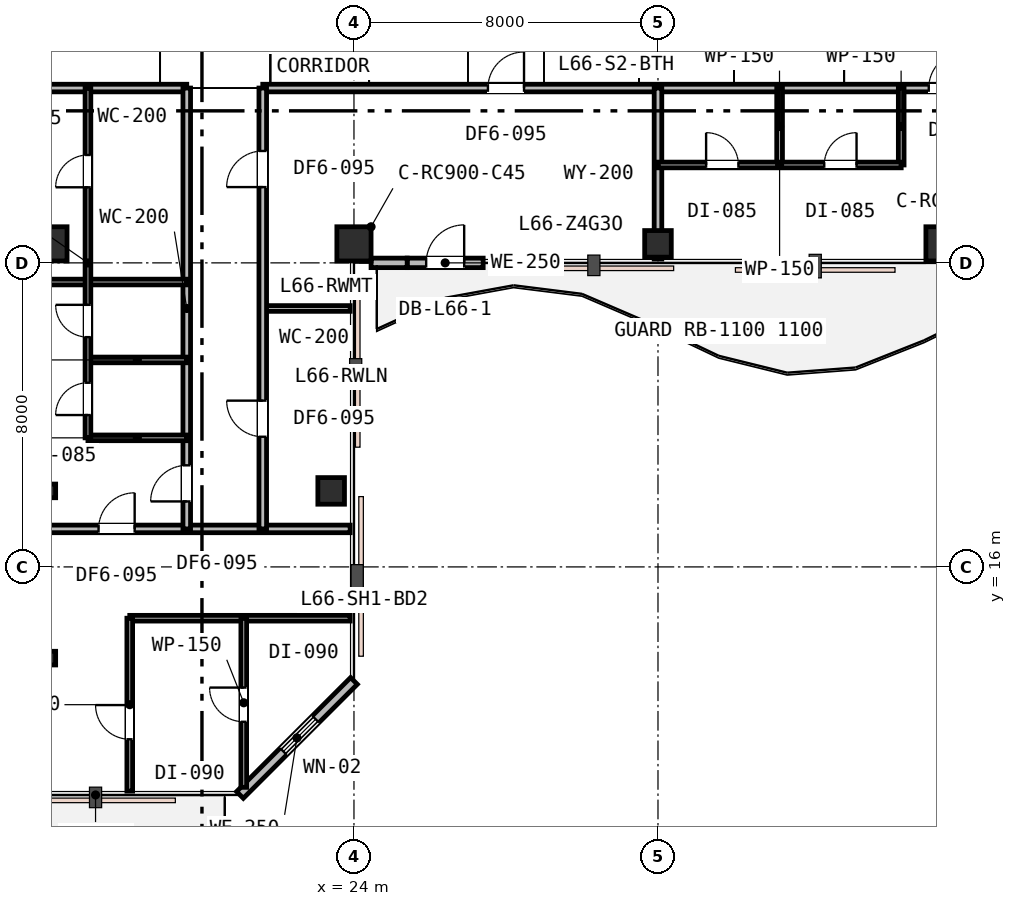
"""IFC4 building model, lengths in metres.
Left out: names, types, materials, properties, quantities, classifications, styles, units other than length and angle.
Written with IfcOpenShell. Run it as: python <this file> out.ifc"""

import sys

from ifc_helpers import new_model, si_unit, direction, frame, frame_2d, origin, origin_2d, place, context, subcontext, project, spatial, rectangle, i_section, extrude, element, fill, save


model = new_model("IFC4")
c1 = context("Model", 3, precision=1e-05, world=origin(), true_north=direction((0.0, 1.0)))
c2 = subcontext(c1, "Body", "Model", "MODEL_VIEW")
j1 = project(units=[si_unit("LENGTHUNIT", "METRE"), si_unit("PLANEANGLEUNIT", "RADIAN")], contexts=[c1])
p1 = place(None, origin())
s1 = spatial("IfcSite", under=j1, at=p1, CompositionType="ELEMENT")
p2 = place(p1, origin())
s2 = spatial("IfcBuilding", under=s1, at=p2, CompositionType="ELEMENT")
p3 = place(p2, frame((0.0, 0.0, 256.4)))
s3 = spatial("IfcBuildingStorey", under=s2, at=p3, CompositionType="ELEMENT", Elevation=256.4)
for number, where, z_axis, x_axis in (
    (1, (16.0, 24.5, 0.0), (0.0, 0.0, 1.0), (1.0, 0.0, 0.0)),
    (2, (24.0, 24.5, 0.0), (0.0, 0.0, 1.0), (1.0, 0.0, 0.0)),
):
    element("IfcColumn", number, at=place(p3, frame(where, z_axis=z_axis, x_axis=x_axis)), inside=s3, PredefinedType="COLUMN", context=c2, shape_type="SweptSolid", body=[
        extrude(rectangle(XDim=0.9, YDim=0.9, at=origin_2d()), origin(), (0.0, 0.0, 1.0), 3.8),
    ])
p4 = place(p3, frame((32.0, 24.5, 0.0), z_axis=(0.0, 0.0, 1.0), x_axis=(1.0, 0.0, 0.0)))
e3 = element("IfcColumn", 3, at=p4, inside=s3, PredefinedType="COLUMN", context=c2, shape_type="SweptSolid", body=[
    extrude(rectangle(XDim=0.7, YDim=0.7, at=origin_2d()), origin(), (0.0, 0.0, 1.0), 3.8),
])
p5 = place(p3, frame((39.5, 24.5, 0.0), z_axis=(0.0, 0.0, 1.0), x_axis=(1.0, 0.0, 0.0)))
e4 = element("IfcColumn", 4, at=p5, inside=s3, PredefinedType="COLUMN", context=c2, shape_type="SweptSolid", body=[
    extrude(rectangle(XDim=0.9, YDim=0.9, at=origin_2d()), origin(), (0.0, 0.0, 1.0), 3.8),
])
p6 = place(p3, frame((23.4, 18.0, 0.0), z_axis=(0.0, 0.0, 1.0), x_axis=(1.0, 0.0, 0.0)))
e5 = element("IfcColumn", 5, at=p6, inside=s3, PredefinedType="COLUMN", context=c2, shape_type="SweptSolid", body=[
    extrude(rectangle(XDim=0.7, YDim=0.7, at=origin_2d()), origin(), (0.0, 0.0, 1.0), 3.8),
])
for number, where, z_axis, x_axis in (
    (6, (16.0, 13.6, 0.0), (0.0, 0.0, 1.0), (1.0, 0.0, 0.0)),
    (7, (16.0, 18.0, 0.0), (0.0, 0.0, 1.0), (1.0, 0.0, 0.0)),
):
    element("IfcColumn", number, at=place(p3, frame(where, z_axis=z_axis, x_axis=x_axis)), inside=s3, PredefinedType="COLUMN", context=c2, shape_type="SweptSolid", body=[
        extrude(i_section(OverallWidth=0.3, OverallDepth=0.36, WebThickness=0.013, FlangeThickness=0.022, FilletRadius=0.027, at=origin_2d()), origin(), (0.0, 0.0, 1.0), 3.8),
    ])
p7 = place(p3, frame((21.0, 10.0, 0.0), z_axis=(0.0, 0.0, 1.0), x_axis=(0.707106781187, 0.707106781187, 0.0)))
e8 = element("IfcWall", 8, at=p7, inside=s3, PredefinedType="STANDARD", context=c2, shape_type="SweptSolid", body=[
    extrude(rectangle(XDim=4.243, YDim=0.25, at=frame_2d((2.121, 0.0))), origin(), (0.0, 0.0, 1.0), 3.53),
])
p8 = place(p7, frame((1.617, 0.0, 0.85)))
e9 = element("IfcOpeningElement", 9, at=p8, cuts=e8, PredefinedType="OPENING", context=c2, shape_type="SweptSolid", body=[
    extrude(rectangle(XDim=1.2, YDim=1.6, at=frame_2d((0.6, 0.8))), frame((0.0, 0.135, 0.0), z_axis=(0.0, -1.0, 0.0), x_axis=(1.0, 0.0, 0.0)), (0.0, 0.0, 1.0), 0.27),
])
p9 = place(p3, frame((25.4, 24.0, 0.0), z_axis=(0.0, 0.0, 1.0), x_axis=(1.0, 0.0, 0.0)))
e10 = element("IfcWall", 10, at=p9, inside=s3, PredefinedType="STANDARD", context=c2, shape_type="SweptSolid", body=[
    extrude(rectangle(XDim=2.0, YDim=0.25, at=frame_2d((1.0, 0.0))), origin(), (0.0, 0.0, 1.0), 3.27),
])
p10 = place(p9, frame((0.5, 0.0, 0.0)))
e11 = element("IfcOpeningElement", 11, at=p10, cuts=e10, PredefinedType="OPENING", context=c2, shape_type="SweptSolid", body=[
    extrude(rectangle(XDim=1.0, YDim=2.15, at=frame_2d((0.5, 1.075))), frame((0.0, 0.135, 0.0), z_axis=(0.0, -1.0, 0.0), x_axis=(1.0, 0.0, 0.0)), (0.0, 0.0, 1.0), 0.27),
])
p11 = place(p3, frame((24.45, 24.0, 0.0), z_axis=(0.0, 0.0, 1.0), x_axis=(1.0, 0.0, 0.0)))
e12 = element("IfcWall", 12, at=p11, inside=s3, PredefinedType="STANDARD", context=c2, shape_type="SweptSolid", body=[
    extrude(rectangle(XDim=0.95, YDim=0.25, at=frame_2d((0.475, 0.0))), origin(), (0.0, 0.0, 1.0), 3.27),
])
p12 = place(p3, frame((15.2, 28.6, 0.0), z_axis=(0.0, 0.0, 1.0), x_axis=(1.0, 0.0, 0.0)))
e13 = element("IfcWall", 13, at=p12, inside=s3, PredefinedType="PARTITIONING", context=c2, shape_type="SweptSolid", body=[
    extrude(rectangle(XDim=4.4, YDim=0.2, at=frame_2d((2.2, 0.0))), origin(), (0.0, 0.0, 1.0), 3.16),
])
p13 = place(p3, frame((21.6, 28.6, 0.0), z_axis=(0.0, 0.0, 1.0), x_axis=(1.0, 0.0, 0.0)))
e14 = element("IfcWall", 14, at=p13, inside=s3, PredefinedType="PARTITIONING", context=c2, shape_type="SweptSolid", body=[
    extrude(rectangle(XDim=24.3, YDim=0.2, at=frame_2d((12.15, 0.0))), origin(), (0.0, 0.0, 1.0), 3.16),
])
p14 = place(p13, frame((5.925, 0.0, 0.0)))
e15 = element("IfcOpeningElement", 15, at=p14, cuts=e14, PredefinedType="OPENING", context=c2, shape_type="SweptSolid", body=[
    extrude(rectangle(XDim=0.95, YDim=2.15, at=frame_2d((0.475, 1.075))), frame((0.0, 0.11, 0.0), z_axis=(0.0, -1.0, 0.0), x_axis=(1.0, 0.0, 0.0)), (0.0, 0.0, 1.0), 0.22),
])
p15 = place(p13, frame((17.525, 0.0, 0.0)))
e16 = element("IfcOpeningElement", 16, at=p15, cuts=e14, PredefinedType="OPENING", context=c2, shape_type="SweptSolid", body=[
    extrude(rectangle(XDim=0.95, YDim=2.15, at=frame_2d((0.475, 1.075))), frame((0.0, 0.11, 0.0), z_axis=(0.0, -1.0, 0.0), x_axis=(1.0, 0.0, 0.0)), (0.0, 0.0, 1.0), 0.22),
])
p16 = place(p3, frame((32.0, 24.1, 0.0), z_axis=(0.0, 0.0, 1.0), x_axis=(0.0, 1.0, 0.0)))
e17 = element("IfcWall", 17, at=p16, inside=s3, PredefinedType="PARTITIONING", context=c2, shape_type="SweptSolid", body=[
    extrude(rectangle(XDim=4.5, YDim=0.2, at=frame_2d((2.25, 0.0))), origin(), (0.0, 0.0, 1.0), 3.16),
])
for number, where, z_axis, x_axis in (
    (18, (38.4, 26.576, 0.0), (0.0, 0.0, 1.0), (0.0, 1.0, 0.0)),
    (19, (35.2, 26.576, 0.0), (0.0, 0.0, 1.0), (0.0, 1.0, 0.0)),
):
    element("IfcWall", number, at=place(p3, frame(where, z_axis=z_axis, x_axis=x_axis)), inside=s3, PredefinedType="PARTITIONING", context=c2, shape_type="SweptSolid", body=[
        extrude(rectangle(XDim=2.024, YDim=0.15, at=frame_2d((1.012, 0.0))), origin(), (0.0, 0.0, 1.0), 3.53),
    ])
p17 = place(p3, frame((32.0, 26.576, 0.0), z_axis=(0.0, 0.0, 1.0), x_axis=(1.0, 0.0, 0.0)))
e20 = element("IfcWall", 20, at=p17, inside=s3, PredefinedType="PARTITIONING", context=c2, shape_type="SweptSolid", body=[
    extrude(rectangle(XDim=6.4, YDim=0.15, at=frame_2d((3.2, 0.0))), origin(), (0.0, 0.0, 1.0), 3.16),
])
p18 = place(p17, frame((1.266, 0.0, 0.0)))
e21 = element("IfcOpeningElement", 21, at=p18, cuts=e20, PredefinedType="OPENING", context=c2, shape_type="SweptSolid", body=[
    extrude(rectangle(XDim=0.85, YDim=2.15, at=frame_2d((0.425, 1.075))), frame((0.0, 0.085, 0.0), z_axis=(0.0, -1.0, 0.0), x_axis=(1.0, 0.0, 0.0)), (0.0, 0.0, 1.0), 0.17),
])
p19 = place(p17, frame((4.375, 0.0, 0.0)))
e22 = element("IfcOpeningElement", 22, at=p19, cuts=e20, PredefinedType="OPENING", context=c2, shape_type="SweptSolid", body=[
    extrude(rectangle(XDim=0.85, YDim=2.15, at=frame_2d((0.425, 1.075))), frame((0.0, 0.085, 0.0), z_axis=(0.0, -1.0, 0.0), x_axis=(1.0, 0.0, 0.0)), (0.0, 0.0, 1.0), 0.17),
])
p20 = place(p3, frame((5.1, 17.0, 0.0), z_axis=(0.0, 0.0, 1.0), x_axis=(1.0, 0.0, 0.0)))
e23 = element("IfcWall", 23, at=p20, inside=s3, PredefinedType="PARTITIONING", context=c2, shape_type="SweptSolid", body=[
    extrude(rectangle(XDim=18.8, YDim=0.2, at=frame_2d((9.4, 0.0))), origin(), (0.0, 0.0, 1.0), 3.16),
])
p21 = place(p20, frame((12.179, 0.0, 0.0)))
e24 = element("IfcOpeningElement", 24, at=p21, cuts=e23, PredefinedType="OPENING", context=c2, shape_type="SweptSolid", body=[
    extrude(rectangle(XDim=0.95, YDim=2.15, at=frame_2d((0.475, 1.075))), frame((0.0, 0.11, 0.0), z_axis=(0.0, -1.0, 0.0), x_axis=(1.0, 0.0, 0.0)), (0.0, 0.0, 1.0), 0.22),
])
p22 = place(p3, frame((19.6, 17.0, 0.0), z_axis=(0.0, 0.0, 1.0), x_axis=(0.0, 1.0, 0.0)))
e25 = element("IfcWall", 25, at=p22, inside=s3, PredefinedType="PARTITIONING", context=c2, shape_type="SweptSolid", body=[
    extrude(rectangle(XDim=11.6, YDim=0.2, at=frame_2d((5.8, 0.0))), origin(), (0.0, 0.0, 1.0), 3.16),
])
p23 = place(p22, frame((0.723, 0.0, 0.0)))
e26 = element("IfcOpeningElement", 26, at=p23, cuts=e25, PredefinedType="OPENING", context=c2, shape_type="SweptSolid", body=[
    extrude(rectangle(XDim=0.95, YDim=2.15, at=frame_2d((0.475, 1.075))), frame((0.0, 0.11, 0.0), z_axis=(0.0, -1.0, 0.0), x_axis=(1.0, 0.0, 0.0)), (0.0, 0.0, 1.0), 0.22),
])
for number, where, z_axis, x_axis in (
    (27, (17.0, 19.396, 0.0), (0.0, 0.0, 1.0), (1.0, 0.0, 0.0)),
    (28, (17.0, 21.446, 0.0), (0.0, 0.0, 1.0), (1.0, 0.0, 0.0)),
):
    element("IfcWall", number, at=place(p3, frame(where, z_axis=z_axis, x_axis=x_axis)), inside=s3, PredefinedType="PARTITIONING", context=c2, shape_type="SweptSolid", body=[
        extrude(rectangle(XDim=2.6, YDim=0.15, at=frame_2d((1.3, 0.0))), origin(), (0.0, 0.0, 1.0), 3.53),
    ])
p24 = place(p3, frame((5.1, 23.496, 0.0), z_axis=(0.0, 0.0, 1.0), x_axis=(1.0, 0.0, 0.0)))
e29 = element("IfcWall", 29, at=p24, inside=s3, PredefinedType="PARTITIONING", context=c2, shape_type="SweptSolid", body=[
    extrude(rectangle(XDim=14.5, YDim=0.15, at=frame_2d((7.25, 0.0))), origin(), (0.0, 0.0, 1.0), 3.16),
])
p25 = place(p24, frame((5.5, 0.0, 0.0)))
e30 = element("IfcOpeningElement", 30, at=p25, cuts=e29, PredefinedType="OPENING", context=c2, shape_type="SweptSolid", body=[
    extrude(rectangle(XDim=0.9, YDim=2.15, at=frame_2d((0.45, 1.075))), frame((0.0, 0.085, 0.0), z_axis=(0.0, -1.0, 0.0), x_axis=(1.0, 0.0, 0.0)), (0.0, 0.0, 1.0), 0.17),
])
p26 = place(p3, frame((17.0, 19.396, 0.0), z_axis=(0.0, 0.0, 1.0), x_axis=(0.0, 1.0, 0.0)))
e31 = element("IfcWall", 31, at=p26, inside=s3, PredefinedType="PARTITIONING", context=c2, shape_type="SweptSolid", body=[
    extrude(rectangle(XDim=9.204, YDim=0.15, at=frame_2d((4.602, 0.0))), origin(), (0.0, 0.0, 1.0), 3.16),
])
p27 = place(p26, frame((0.6, 0.0, 0.0)))
e32 = element("IfcOpeningElement", 32, at=p27, cuts=e31, PredefinedType="OPENING", context=c2, shape_type="SweptSolid", body=[
    extrude(rectangle(XDim=0.85, YDim=2.15, at=frame_2d((0.425, 1.075))), frame((0.0, 0.085, 0.0), z_axis=(0.0, -1.0, 0.0), x_axis=(1.0, 0.0, 0.0)), (0.0, 0.0, 1.0), 0.17),
])
p28 = place(p26, frame((2.65, 0.0, 0.0)))
e33 = element("IfcOpeningElement", 33, at=p28, cuts=e31, PredefinedType="OPENING", context=c2, shape_type="SweptSolid", body=[
    extrude(rectangle(XDim=0.85, YDim=2.15, at=frame_2d((0.425, 1.075))), frame((0.0, 0.085, 0.0), z_axis=(0.0, -1.0, 0.0), x_axis=(1.0, 0.0, 0.0)), (0.0, 0.0, 1.0), 0.17),
])
p29 = place(p26, frame((6.593, 0.0, 0.0)))
e34 = element("IfcOpeningElement", 34, at=p29, cuts=e31, PredefinedType="OPENING", context=c2, shape_type="SweptSolid", body=[
    extrude(rectangle(XDim=0.85, YDim=2.15, at=frame_2d((0.425, 1.075))), frame((0.0, 0.085, 0.0), z_axis=(0.0, -1.0, 0.0), x_axis=(1.0, 0.0, 0.0)), (0.0, 0.0, 1.0), 0.17),
])
p30 = place(p3, frame((21.6, 22.8, 0.0), z_axis=(0.0, 0.0, 1.0), x_axis=(1.0, 0.0, 0.0)))
e35 = element("IfcWall", 35, at=p30, inside=s3, PredefinedType="PARTITIONING", context=c2, shape_type="SweptSolid", body=[
    extrude(rectangle(XDim=2.3, YDim=0.15, at=frame_2d((1.15, 0.0))), origin(), (0.0, 0.0, 1.0), 3.53),
])
p31 = place(p3, frame((21.6, 17.0, 0.0), z_axis=(0.0, 0.0, 1.0), x_axis=(0.0, 1.0, 0.0)))
e36 = element("IfcWall", 36, at=p31, inside=s3, PredefinedType="PARTITIONING", context=c2, shape_type="SweptSolid", body=[
    extrude(rectangle(XDim=11.6, YDim=0.2, at=frame_2d((5.8, 0.0))), origin(), (0.0, 0.0, 1.0), 3.16),
])
p32 = place(p31, frame((8.994, 0.0, 0.0)))
e37 = element("IfcOpeningElement", 37, at=p32, cuts=e36, PredefinedType="OPENING", context=c2, shape_type="SweptSolid", body=[
    extrude(rectangle(XDim=0.95, YDim=2.15, at=frame_2d((0.475, 1.075))), frame((0.0, 0.11, 0.0), z_axis=(0.0, -1.0, 0.0), x_axis=(1.0, 0.0, 0.0)), (0.0, 0.0, 1.0), 0.22),
])
p33 = place(p31, frame((2.425, 0.0, 0.0)))
e38 = element("IfcOpeningElement", 38, at=p33, cuts=e36, PredefinedType="OPENING", context=c2, shape_type="SweptSolid", body=[
    extrude(rectangle(XDim=0.95, YDim=2.15, at=frame_2d((0.475, 1.075))), frame((0.0, 0.11, 0.0), z_axis=(0.0, -1.0, 0.0), x_axis=(1.0, 0.0, 0.0)), (0.0, 0.0, 1.0), 0.22),
])
p34 = place(p3, frame((18.1, 14.65, 0.0), z_axis=(0.0, 0.0, 1.0), x_axis=(1.0, 0.0, 0.0)))
e39 = element("IfcWall", 39, at=p34, inside=s3, PredefinedType="PARTITIONING", context=c2, shape_type="SweptSolid", body=[
    extrude(rectangle(XDim=5.8, YDim=0.15, at=frame_2d((2.9, 0.0))), origin(), (0.0, 0.0, 1.0), 3.53),
])
p35 = place(p3, frame((21.1, 10.2, 0.0), z_axis=(0.0, 0.0, 1.0), x_axis=(0.0, 1.0, 0.0)))
e40 = element("IfcWall", 40, at=p35, inside=s3, PredefinedType="PARTITIONING", context=c2, shape_type="SweptSolid", body=[
    extrude(rectangle(XDim=4.45, YDim=0.15, at=frame_2d((2.225, 0.0))), origin(), (0.0, 0.0, 1.0), 3.53),
])
p36 = place(p35, frame((1.725, 0.0, 0.0)))
e41 = element("IfcOpeningElement", 41, at=p36, cuts=e40, PredefinedType="OPENING", context=c2, shape_type="SweptSolid", body=[
    extrude(rectangle(XDim=0.9, YDim=2.15, at=frame_2d((0.45, 1.075))), frame((0.0, 0.085, 0.0), z_axis=(0.0, -1.0, 0.0), x_axis=(1.0, 0.0, 0.0)), (0.0, 0.0, 1.0), 0.17),
])
p37 = place(p3, frame((18.1, 10.1, 0.0), z_axis=(0.0, 0.0, 1.0), x_axis=(0.0, 1.0, 0.0)))
e42 = element("IfcWall", 42, at=p37, inside=s3, PredefinedType="PARTITIONING", context=c2, shape_type="SweptSolid", body=[
    extrude(rectangle(XDim=4.55, YDim=0.15, at=frame_2d((2.275, 0.0))), origin(), (0.0, 0.0, 1.0), 3.53),
])
p38 = place(p37, frame((1.365, 0.0, 0.0)))
e43 = element("IfcOpeningElement", 43, at=p38, cuts=e42, PredefinedType="OPENING", context=c2, shape_type="SweptSolid", body=[
    extrude(rectangle(XDim=0.9, YDim=2.15, at=frame_2d((0.45, 1.075))), frame((0.0, 0.085, 0.0), z_axis=(0.0, -1.0, 0.0), x_axis=(1.0, 0.0, 0.0)), (0.0, 0.0, 1.0), 0.17),
])
p39 = place(p8, origin())
e44 = element("IfcWindow", 44, at=p39, inside=s3, PartitioningType="SINGLE_PANEL", PredefinedType="WINDOW", context=c2, shape_type="SweptSolid", body=[
    extrude(rectangle(XDim=1.2, YDim=1.6, at=frame_2d((0.6, 0.8))), frame((0.0, 0.03, 0.0), z_axis=(0.0, -1.0, 0.0), x_axis=(1.0, 0.0, 0.0)), (0.0, 0.0, 1.0), 0.06),
])
fill(e9, e44)
p40 = place(p10, origin())
e45 = element("IfcDoor", 45, at=p40, inside=s3, OperationType="SINGLE_SWING_RIGHT", PredefinedType="DOOR", context=c2, shape_type="SweptSolid", body=[
    extrude(rectangle(XDim=1.0, YDim=2.15, at=frame_2d((0.5, 1.075))), frame((0.0, 0.025, 0.0), z_axis=(0.0, -1.0, 0.0), x_axis=(1.0, 0.0, 0.0)), (0.0, 0.0, 1.0), 0.05),
])
fill(e11, e45)
p41 = place(p14, origin())
e46 = element("IfcDoor", 46, at=p41, inside=s3, OperationType="SINGLE_SWING_RIGHT", PredefinedType="DOOR", context=c2, shape_type="SweptSolid", body=[
    extrude(rectangle(XDim=0.95, YDim=2.15, at=frame_2d((0.475, 1.075))), frame((0.0, 0.025, 0.0), z_axis=(0.0, -1.0, 0.0), x_axis=(1.0, 0.0, 0.0)), (0.0, 0.0, 1.0), 0.05),
])
fill(e15, e46)
p42 = place(p15, origin())
e47 = element("IfcDoor", 47, at=p42, inside=s3, OperationType="SINGLE_SWING_RIGHT", PredefinedType="DOOR", context=c2, shape_type="SweptSolid", body=[
    extrude(rectangle(XDim=0.95, YDim=2.15, at=frame_2d((0.475, 1.075))), frame((0.0, 0.025, 0.0), z_axis=(0.0, -1.0, 0.0), x_axis=(1.0, 0.0, 0.0)), (0.0, 0.0, 1.0), 0.05),
])
fill(e16, e47)
p43 = place(p18, origin())
e48 = element("IfcDoor", 48, at=p43, inside=s3, OperationType="SINGLE_SWING_LEFT", PredefinedType="DOOR", context=c2, shape_type="SweptSolid", body=[
    extrude(rectangle(XDim=0.85, YDim=2.15, at=frame_2d((0.425, 1.075))), frame((0.0, 0.025, 0.0), z_axis=(0.0, -1.0, 0.0), x_axis=(1.0, 0.0, 0.0)), (0.0, 0.0, 1.0), 0.05),
])
fill(e21, e48)
p44 = place(p19, origin())
e49 = element("IfcDoor", 49, at=p44, inside=s3, OperationType="SINGLE_SWING_RIGHT", PredefinedType="DOOR", context=c2, shape_type="SweptSolid", body=[
    extrude(rectangle(XDim=0.85, YDim=2.15, at=frame_2d((0.425, 1.075))), frame((0.0, 0.025, 0.0), z_axis=(0.0, -1.0, 0.0), x_axis=(1.0, 0.0, 0.0)), (0.0, 0.0, 1.0), 0.05),
])
fill(e22, e49)
p45 = place(p23, origin())
e50 = element("IfcDoor", 50, at=p45, inside=s3, OperationType="SINGLE_SWING_LEFT", PredefinedType="DOOR", context=c2, shape_type="SweptSolid", body=[
    extrude(rectangle(XDim=0.95, YDim=2.15, at=frame_2d((0.475, 1.075))), frame((0.0, 0.025, 0.0), z_axis=(0.0, -1.0, 0.0), x_axis=(1.0, 0.0, 0.0)), (0.0, 0.0, 1.0), 0.05),
])
fill(e26, e50)
p46 = place(p27, origin())
e51 = element("IfcDoor", 51, at=p46, inside=s3, OperationType="SINGLE_SWING_LEFT", PredefinedType="DOOR", context=c2, shape_type="SweptSolid", body=[
    extrude(rectangle(XDim=0.85, YDim=2.15, at=frame_2d((0.425, 1.075))), frame((0.0, 0.025, 0.0), z_axis=(0.0, -1.0, 0.0), x_axis=(1.0, 0.0, 0.0)), (0.0, 0.0, 1.0), 0.05),
])
fill(e32, e51)
p47 = place(p28, origin())
e52 = element("IfcDoor", 52, at=p47, inside=s3, OperationType="SINGLE_SWING_RIGHT", PredefinedType="DOOR", context=c2, shape_type="SweptSolid", body=[
    extrude(rectangle(XDim=0.85, YDim=2.15, at=frame_2d((0.425, 1.075))), frame((0.0, 0.025, 0.0), z_axis=(0.0, -1.0, 0.0), x_axis=(1.0, 0.0, 0.0)), (0.0, 0.0, 1.0), 0.05),
])
fill(e33, e52)
p48 = place(p29, origin())
e53 = element("IfcDoor", 53, at=p48, inside=s3, OperationType="SINGLE_SWING_LEFT", PredefinedType="DOOR", context=c2, shape_type="SweptSolid", body=[
    extrude(rectangle(XDim=0.85, YDim=2.15, at=frame_2d((0.425, 1.075))), frame((0.0, 0.025, 0.0), z_axis=(0.0, -1.0, 0.0), x_axis=(1.0, 0.0, 0.0)), (0.0, 0.0, 1.0), 0.05),
])
fill(e34, e53)
p49 = place(p32, origin())
e54 = element("IfcDoor", 54, at=p49, inside=s3, OperationType="SINGLE_SWING_LEFT", PredefinedType="DOOR", context=c2, shape_type="SweptSolid", body=[
    extrude(rectangle(XDim=0.95, YDim=2.15, at=frame_2d((0.475, 1.075))), frame((0.0, 0.025, 0.0), z_axis=(0.0, -1.0, 0.0), x_axis=(1.0, 0.0, 0.0)), (0.0, 0.0, 1.0), 0.05),
])
fill(e37, e54)
p50 = place(p33, origin())
e55 = element("IfcDoor", 55, at=p50, inside=s3, OperationType="SINGLE_SWING_RIGHT", PredefinedType="DOOR", context=c2, shape_type="SweptSolid", body=[
    extrude(rectangle(XDim=0.95, YDim=2.15, at=frame_2d((0.475, 1.075))), frame((0.0, 0.025, 0.0), z_axis=(0.0, -1.0, 0.0), x_axis=(1.0, 0.0, 0.0)), (0.0, 0.0, 1.0), 0.05),
])
fill(e38, e55)
p51 = place(p21, origin())
e56 = element("IfcDoor", 56, at=p51, inside=s3, OperationType="SINGLE_SWING_RIGHT", PredefinedType="DOOR", context=c2, shape_type="SweptSolid", body=[
    extrude(rectangle(XDim=0.95, YDim=2.15, at=frame_2d((0.475, 1.075))), frame((0.0, 0.025, 0.0), z_axis=(0.0, -1.0, 0.0), x_axis=(1.0, 0.0, 0.0)), (0.0, 0.0, 1.0), 0.05),
])
fill(e24, e56)
p52 = place(p36, origin())
e57 = element("IfcDoor", 57, at=p52, inside=s3, OperationType="SINGLE_SWING_RIGHT", PredefinedType="DOOR", context=c2, shape_type="SweptSolid", body=[
    extrude(rectangle(XDim=0.9, YDim=2.15, at=frame_2d((0.45, 1.075))), frame((0.0, 0.025, 0.0), z_axis=(0.0, -1.0, 0.0), x_axis=(1.0, 0.0, 0.0)), (0.0, 0.0, 1.0), 0.05),
])
fill(e41, e57)
p53 = place(p38, origin())
e58 = element("IfcDoor", 58, at=p53, inside=s3, OperationType="SINGLE_SWING_RIGHT", PredefinedType="DOOR", context=c2, shape_type="SweptSolid", body=[
    extrude(rectangle(XDim=0.9, YDim=2.15, at=frame_2d((0.45, 1.075))), frame((0.0, 0.025, 0.0), z_axis=(0.0, -1.0, 0.0), x_axis=(1.0, 0.0, 0.0)), (0.0, 0.0, 1.0), 0.05),
])
fill(e43, e58)
save(model, sys.argv[1])
